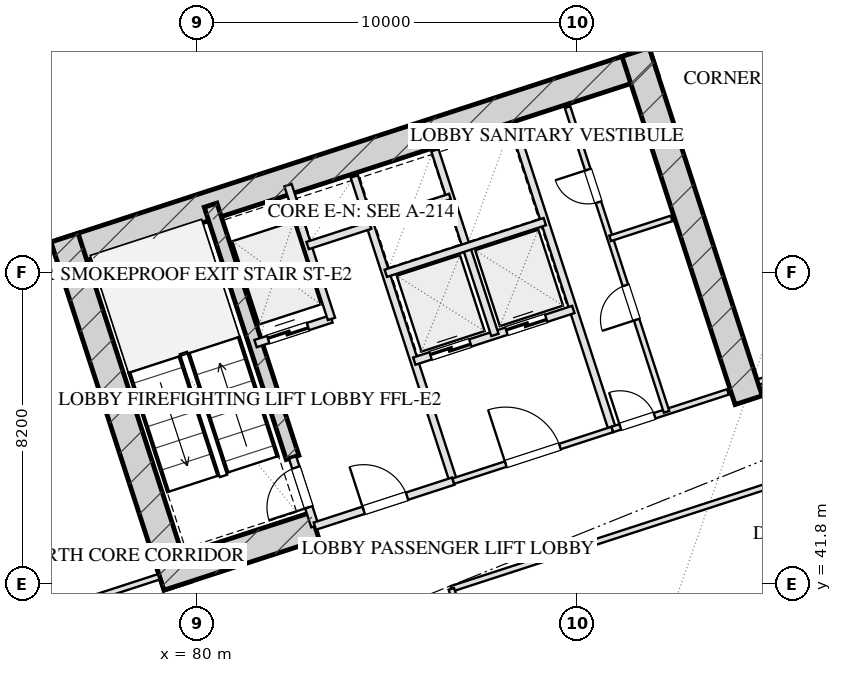
"""IFC4 building model, lengths in metres.
Left out: names, types, materials, properties, quantities, classifications, styles, units other than length and angle.
Written with IfcOpenShell. Run it as: python <this file> out.ifc"""

import sys

from ifc_helpers import new_model, si_unit, direction, frame, frame_2d, origin, place, context, subcontext, project, spatial, rectangle, extrude, element, fill, save


model = new_model("IFC4")
c1 = context("Model", 3, precision=1e-05, world=origin(), true_north=direction((0.0, 1.0)))
c2 = subcontext(c1, "Body", "Model", "MODEL_VIEW")
j1 = project(units=[si_unit("LENGTHUNIT", "METRE"), si_unit("PLANEANGLEUNIT", "RADIAN")], contexts=[c1])
p1 = place(None, origin())
s1 = spatial("IfcSite", under=j1, at=p1, CompositionType="ELEMENT")
p2 = place(p1, origin())
s2 = spatial("IfcBuilding", under=s1, at=p2, CompositionType="ELEMENT")
p3 = place(p2, frame((0.0, 0.0, 26.0)))
s3 = spatial("IfcBuildingStorey", under=s2, at=p3, CompositionType="ELEMENT", Elevation=26.0)
p4 = place(p3, frame((76.272, 50.443, 0.0), z_axis=(0.0, 0.0, 1.0), x_axis=(0.951056072937, 0.309018358888, 0.0)))
e1 = element("IfcWall", 1, at=p4, inside=s3, PredefinedType="SHEAR", context=c2, shape_type="SweptSolid", body=[
    extrude(rectangle(XDim=16.55, YDim=0.75, at=frame_2d((8.275, 0.0))), origin(), (0.0, 0.0, 1.0), 4.0),
])
for number, where, z_axis, x_axis in (
    (2, (79.489, 41.756, 0.0), (0.0, 0.0, 1.0), (-0.309, 0.951, 0.0)),
    (3, (94.515, 46.639, 0.0), (0.0, 0.0, 1.0), (-0.309, 0.951, 0.0)),
):
    element("IfcWall", number, at=place(p3, frame(where, z_axis=z_axis, x_axis=x_axis)), inside=s3, PredefinedType="SHEAR", context=c2, shape_type="SweptSolid", body=[
        extrude(rectangle(XDim=9.63, YDim=0.75, at=frame_2d((4.815, 0.0))), origin(), (0.0, 0.0, 1.0), 4.0),
    ])
p5 = place(p3, frame((82.514, 45.131, 0.0), z_axis=(0.0, 0.0, 1.0), x_axis=(-0.308988790936, 0.951065679686, 0.0)))
e4 = element("IfcWall", 4, at=p5, inside=s3, PredefinedType="SHEAR", context=c2, shape_type="SweptSolid", body=[
    extrude(rectangle(XDim=6.98, YDim=0.35, at=frame_2d((3.49, 0.0))), origin(), (0.0, 0.0, 1.0), 4.0),
])
p6 = place(p3, frame((79.016, 41.997, 0.0), z_axis=(0.0, 0.0, 1.0), x_axis=(0.95106038264, 0.309005094736, 0.0)))
e5 = element("IfcWall", 5, at=p6, inside=s3, PredefinedType="SHEAR", context=c2, shape_type="SweptSolid", body=[
    extrude(rectangle(XDim=4.295, YDim=0.75, at=frame_2d((2.147, 0.0))), origin(), (0.0, 0.0, 1.0), 4.0),
])
p7 = place(p3, frame((79.655, 4.352, 0.0), z_axis=(0.0, 0.0, 1.0), x_axis=(-0.309014526607, 0.951057318118, 0.0)))
e6 = element("IfcWall", 6, at=p7, inside=s3, PredefinedType="SOLIDWALL", context=c2, shape_type="SweptSolid", body=[
    extrude(rectangle(XDim=50.0, YDim=0.4, at=frame_2d((25.0, 0.0))), origin(), (0.0, 0.0, 1.0), 3.16),
])
p8 = place(p7, frame((17.35, 0.0, 0.75)))
e7 = element("IfcOpeningElement", 7, at=p8, cuts=e6, PredefinedType="OPENING", context=c2, shape_type="SweptSolid", body=[
    extrude(rectangle(XDim=2.5, YDim=1.75, at=frame_2d((1.25, 0.875))), frame((0.0, 0.21, 0.0), z_axis=(0.0, -1.0, 0.0), x_axis=(1.0, 0.0, 0.0)), (0.0, 0.0, 1.0), 0.42),
])
p9 = place(p7, frame((21.15, 0.0, 0.75)))
e8 = element("IfcOpeningElement", 8, at=p9, cuts=e6, PredefinedType="OPENING", context=c2, shape_type="SweptSolid", body=[
    extrude(rectangle(XDim=2.5, YDim=1.75, at=frame_2d((1.25, 0.875))), frame((0.0, 0.21, 0.0), z_axis=(0.0, -1.0, 0.0), x_axis=(1.0, 0.0, 0.0)), (0.0, 0.0, 1.0), 0.42),
])
p10 = place(p7, frame((26.35, 0.0, 0.75)))
e9 = element("IfcOpeningElement", 9, at=p10, cuts=e6, PredefinedType="OPENING", context=c2, shape_type="SweptSolid", body=[
    extrude(rectangle(XDim=2.5, YDim=1.75, at=frame_2d((1.25, 0.875))), frame((0.0, 0.21, 0.0), z_axis=(0.0, -1.0, 0.0), x_axis=(1.0, 0.0, 0.0)), (0.0, 0.0, 1.0), 0.42),
])
p11 = place(p7, frame((30.15, 0.0, 0.75)))
e10 = element("IfcOpeningElement", 10, at=p11, cuts=e6, PredefinedType="OPENING", context=c2, shape_type="SweptSolid", body=[
    extrude(rectangle(XDim=2.5, YDim=1.75, at=frame_2d((1.25, 0.875))), frame((0.0, 0.21, 0.0), z_axis=(0.0, -1.0, 0.0), x_axis=(1.0, 0.0, 0.0)), (0.0, 0.0, 1.0), 0.42),
])
p12 = place(p3, frame((66.002, 55.433, 0.0), z_axis=(0.0, 0.0, 1.0), x_axis=(0.951055939317, 0.309018770125, 0.0)))
e11 = element("IfcWall", 11, at=p12, inside=s3, PredefinedType="SOLIDWALL", context=c2, shape_type="SweptSolid", body=[
    extrude(rectangle(XDim=32.4, YDim=0.4, at=frame_2d((16.2, 0.0))), origin(), (0.0, 0.0, 1.0), 3.16),
])
p13 = place(p3, frame((83.101, 43.324, 0.0), z_axis=(0.0, 0.0, 1.0), x_axis=(-0.309048298632, 0.951046344356, 0.0)))
e12 = element("IfcWall", 12, at=p13, inside=s3, PredefinedType="PARTITIONING", context=c2, shape_type="SweptSolid", body=[
    extrude(rectangle(XDim=1.9, YDim=0.2, at=frame_2d((0.95, 0.0))), origin(), (0.0, 0.0, 1.0), 3.725),
])
p14 = place(p13, frame((0.52, 0.0, 0.0)))
e13 = element("IfcOpeningElement", 13, at=p14, cuts=e12, PredefinedType="OPENING", context=c2, shape_type="SweptSolid", body=[
    extrude(rectangle(XDim=1.1, YDim=2.05, at=frame_2d((0.55, 1.025))), frame((0.0, 0.11, 0.0), z_axis=(0.0, -1.0, 0.0), x_axis=(1.0, 0.0, 0.0)), (0.0, 0.0, 1.0), 0.22),
])
p15 = place(p3, frame((86.743, 44.508, 0.0), z_axis=(0.0, 0.0, 1.0), x_axis=(-0.309016001439, 0.951056838919, 0.0)))
e14 = element("IfcWall", 14, at=p15, inside=s3, PredefinedType="PARTITIONING", context=c2, shape_type="SweptSolid", body=[
    extrude(rectangle(XDim=8.43, YDim=0.2, at=frame_2d((4.215, 0.0))), origin(), (0.0, 0.0, 1.0), 3.725),
])
p16 = place(p3, frame((83.101, 43.324, 0.0), z_axis=(0.0, 0.0, 1.0), x_axis=(0.951052804469, 0.309028417967, 0.0)))
e15 = element("IfcWall", 15, at=p16, inside=s3, PredefinedType="PARTITIONING", context=c2, shape_type="SweptSolid", body=[
    extrude(rectangle(XDim=3.83, YDim=0.2, at=frame_2d((1.915, 0.0))), origin(), (0.0, 0.0, 1.0), 3.725),
])
p17 = place(p16, frame((1.35, 0.0, 0.0)))
e16 = element("IfcOpeningElement", 16, at=p17, cuts=e15, PredefinedType="OPENING", context=c2, shape_type="SweptSolid", body=[
    extrude(rectangle(XDim=1.2, YDim=2.05, at=frame_2d((0.6, 1.025))), frame((0.0, 0.11, 0.0), z_axis=(0.0, -1.0, 0.0), x_axis=(1.0, 0.0, 0.0)), (0.0, 0.0, 1.0), 0.22),
])
p18 = place(p3, frame((81.54, 48.127, 0.0), z_axis=(0.0, 0.0, 1.0), x_axis=(0.951062257173, 0.308999325213, 0.0)))
e17 = element("IfcWall", 17, at=p18, inside=s3, PredefinedType="PARTITIONING", context=c2, shape_type="SweptSolid", body=[
    extrude(rectangle(XDim=2.1, YDim=0.2, at=frame_2d((1.05, 0.0))), origin(), (0.0, 0.0, 1.0), 3.725),
])
p19 = place(p18, frame((0.35, 0.0, 0.0)))
e18 = element("IfcOpeningElement", 18, at=p19, cuts=e17, PredefinedType="OPENING", context=c2, shape_type="SweptSolid", body=[
    extrude(rectangle(XDim=1.1, YDim=2.05, at=frame_2d((0.55, 1.025))), frame((0.0, 0.11, 0.0), z_axis=(0.0, -1.0, 0.0), x_axis=(1.0, 0.0, 0.0)), (0.0, 0.0, 1.0), 0.22),
])
p20 = place(p3, frame((83.538, 48.776, 0.0), z_axis=(0.0, 0.0, 1.0), x_axis=(-0.3089935693, 0.951064127245, 0.0)))
e19 = element("IfcWall", 19, at=p20, inside=s3, PredefinedType="PARTITIONING", context=c2, shape_type="SweptSolid", body=[
    extrude(rectangle(XDim=3.7, YDim=0.2, at=frame_2d((1.85, 0.0))), origin(), (0.0, 0.0, 1.0), 3.725),
])
p21 = place(p3, frame((82.91, 50.707, 0.0), z_axis=(0.0, 0.0, 1.0), x_axis=(0.951041328149, 0.309063734775, 0.0)))
e20 = element("IfcWall", 20, at=p21, inside=s3, PredefinedType="PARTITIONING", context=c2, shape_type="SweptSolid", body=[
    extrude(rectangle(XDim=1.73, YDim=0.2, at=frame_2d((0.865, 0.0))), origin(), (0.0, 0.0, 1.0), 3.725),
])
p22 = place(p3, frame((90.928, 45.868, 0.0), z_axis=(0.0, 0.0, 1.0), x_axis=(-0.309042196757, 0.951048327176, 0.0)))
e21 = element("IfcWall", 21, at=p22, inside=s3, PredefinedType="PARTITIONING", context=c2, shape_type="SweptSolid", body=[
    extrude(rectangle(XDim=8.43, YDim=0.2, at=frame_2d((4.215, 0.0))), origin(), (0.0, 0.0, 1.0), 3.725),
])
p23 = place(p3, frame((86.743, 44.508, 0.0), z_axis=(0.0, 0.0, 1.0), x_axis=(0.951063829732, 0.308994485023, 0.0)))
e22 = element("IfcWall", 22, at=p23, inside=s3, PredefinedType="PARTITIONING", context=c2, shape_type="SweptSolid", body=[
    extrude(rectangle(XDim=4.4, YDim=0.15, at=frame_2d((2.2, 0.0))), origin(), (0.0, 0.0, 1.0), 3.725),
])
p24 = place(p23, frame((1.45, 0.0, 0.0)))
e23 = element("IfcOpeningElement", 23, at=p24, cuts=e22, PredefinedType="OPENING", context=c2, shape_type="SweptSolid", body=[
    extrude(rectangle(XDim=1.5, YDim=2.05, at=frame_2d((0.75, 1.025))), frame((0.0, 0.085, 0.0), z_axis=(0.0, -1.0, 0.0), x_axis=(1.0, 0.0, 0.0)), (0.0, 0.0, 1.0), 0.17),
])
p25 = place(p3, frame((85.718, 47.666, 0.0), z_axis=(0.0, 0.0, 1.0), x_axis=(0.951058531764, 0.30901079133, 0.0)))
e24 = element("IfcWall", 24, at=p25, inside=s3, PredefinedType="PARTITIONING", context=c2, shape_type="SweptSolid", body=[
    extrude(rectangle(XDim=4.4, YDim=0.2, at=frame_2d((2.2, 0.0))), origin(), (0.0, 0.0, 1.0), 3.725),
])
p26 = place(p25, frame((0.45, 0.0, 0.0)))
e25 = element("IfcOpeningElement", 25, at=p26, cuts=e24, PredefinedType="OPENING", context=c2, shape_type="SweptSolid", body=[
    extrude(rectangle(XDim=1.1, YDim=2.05, at=frame_2d((0.55, 1.025))), frame((0.0, 0.11, 0.0), z_axis=(0.0, -1.0, 0.0), x_axis=(1.0, 0.0, 0.0)), (0.0, 0.0, 1.0), 0.22),
])
p27 = place(p25, frame((2.55, 0.0, 0.0)))
e26 = element("IfcOpeningElement", 26, at=p27, cuts=e24, PredefinedType="OPENING", context=c2, shape_type="SweptSolid", body=[
    extrude(rectangle(XDim=1.1, YDim=2.05, at=frame_2d((0.55, 1.025))), frame((0.0, 0.11, 0.0), z_axis=(0.0, -1.0, 0.0), x_axis=(1.0, 0.0, 0.0)), (0.0, 0.0, 1.0), 0.22),
])
p28 = place(p3, frame((87.838, 48.354, 0.0), z_axis=(0.0, 0.0, 1.0), x_axis=(-0.3090093719, 0.951058992953, 0.0)))
e27 = element("IfcWall", 27, at=p28, inside=s3, PredefinedType="PARTITIONING", context=c2, shape_type="SweptSolid", body=[
    extrude(rectangle(XDim=5.11, YDim=0.2, at=frame_2d((2.555, 0.0))), origin(), (0.0, 0.0, 1.0), 3.725),
])
p29 = place(p3, frame((84.967, 49.977, 0.0), z_axis=(0.0, 0.0, 1.0), x_axis=(0.951063829732, 0.308994485023, 0.0)))
e28 = element("IfcWall", 28, at=p29, inside=s3, PredefinedType="PARTITIONING", context=c2, shape_type="SweptSolid", body=[
    extrude(rectangle(XDim=4.4, YDim=0.2, at=frame_2d((2.2, 0.0))), origin(), (0.0, 0.0, 1.0), 3.725),
])
p30 = place(p3, frame((84.534, 51.308, 0.0), z_axis=(0.0, 0.0, 1.0), x_axis=(0.951075093106, 0.308959814982, 0.0)))
e29 = element("IfcWall", 29, at=p30, inside=s3, PredefinedType="PARTITIONING", context=c2, shape_type="SweptSolid", body=[
    extrude(rectangle(XDim=2.23, YDim=0.15, at=frame_2d((1.115, 0.0))), origin(), (0.0, 0.0, 1.0), 3.725),
])
p31 = place(p3, frame((90.928, 45.868, 0.0), z_axis=(0.0, 0.0, 1.0), x_axis=(0.951059297078, 0.309008435874, 0.0)))
e30 = element("IfcWall", 30, at=p31, inside=s3, PredefinedType="PARTITIONING", context=c2, shape_type="SweptSolid", body=[
    extrude(rectangle(XDim=3.2, YDim=0.15, at=frame_2d((1.6, 0.0))), origin(), (0.0, 0.0, 1.0), 3.725),
])
p32 = place(p31, frame((0.22, 0.0, 0.0)))
e31 = element("IfcOpeningElement", 31, at=p32, cuts=e30, PredefinedType="OPENING", context=c2, shape_type="SweptSolid", body=[
    extrude(rectangle(XDim=0.95, YDim=2.05, at=frame_2d((0.475, 1.025))), frame((0.0, 0.085, 0.0), z_axis=(0.0, -1.0, 0.0), x_axis=(1.0, 0.0, 0.0)), (0.0, 0.0, 1.0), 0.17),
])
p33 = place(p3, frame((92.355, 46.331, 0.0), z_axis=(0.0, 0.0, 1.0), x_axis=(-0.309007490203, 0.951059604335, 0.0)))
e32 = element("IfcWall", 32, at=p33, inside=s3, PredefinedType="PARTITIONING", context=c2, shape_type="SweptSolid", body=[
    extrude(rectangle(XDim=8.43, YDim=0.15, at=frame_2d((4.215, 0.0))), origin(), (0.0, 0.0, 1.0), 3.725),
])
p34 = place(p33, frame((2.55, 0.0, 0.0)))
e33 = element("IfcOpeningElement", 33, at=p34, cuts=e32, PredefinedType="OPENING", context=c2, shape_type="SweptSolid", body=[
    extrude(rectangle(XDim=0.95, YDim=2.05, at=frame_2d((0.475, 1.025))), frame((0.0, 0.085, 0.0), z_axis=(0.0, -1.0, 0.0), x_axis=(1.0, 0.0, 0.0)), (0.0, 0.0, 1.0), 0.17),
])
p35 = place(p33, frame((5.8, 0.0, 0.0)))
e34 = element("IfcOpeningElement", 34, at=p35, cuts=e32, PredefinedType="OPENING", context=c2, shape_type="SweptSolid", body=[
    extrude(rectangle(XDim=0.9, YDim=2.05, at=frame_2d((0.45, 1.025))), frame((0.0, 0.085, 0.0), z_axis=(0.0, -1.0, 0.0), x_axis=(1.0, 0.0, 0.0)), (0.0, 0.0, 1.0), 0.17),
])
p36 = place(p3, frame((90.871, 50.896, 0.0), z_axis=(0.0, 0.0, 1.0), x_axis=(0.951054116971, 0.309024378638, 0.0)))
e35 = element("IfcWall", 35, at=p36, inside=s3, PredefinedType="PARTITIONING", context=c2, shape_type="SweptSolid", body=[
    extrude(rectangle(XDim=1.7, YDim=0.15, at=frame_2d((0.85, 0.0))), origin(), (0.0, 0.0, 1.0), 3.725),
])
p37 = place(p3, frame((68.721, 38.652, 0.0), z_axis=(0.0, 0.0, 1.0), x_axis=(0.951056658866, 0.309016555588, 0.0)))
e36 = element("IfcWall", 36, at=p37, inside=s3, PredefinedType="PARTITIONING", context=c2, shape_type="SweptSolid", body=[
    extrude(rectangle(XDim=10.8, YDim=0.15, at=frame_2d((5.4, 0.0))), origin(), (0.0, 0.0, 1.0), 3.725),
])
p38 = place(p37, frame((4.536, 0.0, 0.0)))
e37 = element("IfcOpeningElement", 37, at=p38, cuts=e36, PredefinedType="OPENING", context=c2, shape_type="SweptSolid", body=[
    extrude(rectangle(XDim=0.85, YDim=2.05, at=frame_2d((0.425, 1.025))), frame((0.0, 0.085, 0.0), z_axis=(0.0, -1.0, 0.0), x_axis=(1.0, 0.0, 0.0)), (0.0, 0.0, 1.0), 0.17),
])
p39 = place(p3, frame((94.78, 47.119, 0.0), z_axis=(0.0, 0.0, 1.0), x_axis=(0.951054294345, 0.309023832749, 0.0)))
e38 = element("IfcWall", 38, at=p39, inside=s3, PredefinedType="PARTITIONING", context=c2, shape_type="SweptSolid", body=[
    extrude(rectangle(XDim=10.2, YDim=0.15, at=frame_2d((5.1, 0.0))), origin(), (0.0, 0.0, 1.0), 3.725),
])
p40 = place(p39, frame((4.284, 0.0, 0.0)))
e39 = element("IfcOpeningElement", 39, at=p40, cuts=e38, PredefinedType="OPENING", context=c2, shape_type="SweptSolid", body=[
    extrude(rectangle(XDim=1.0, YDim=2.05, at=frame_2d((0.5, 1.025))), frame((0.0, 0.085, 0.0), z_axis=(0.0, -1.0, 0.0), x_axis=(1.0, 0.0, 0.0)), (0.0, 0.0, 1.0), 0.17),
])
p41 = place(p3, frame((86.692, 41.673, 0.0), z_axis=(0.0, 0.0, 1.0), x_axis=(0.951055605195, 0.309019798438, 0.0)))
e40 = element("IfcWall", 40, at=p41, inside=s3, PredefinedType="PARTITIONING", context=c2, shape_type="SweptSolid", body=[
    extrude(rectangle(XDim=19.575, YDim=0.15, at=frame_2d((9.788, 0.0))), origin(), (0.0, 0.0, 1.0), 3.725),
])
p42 = place(p3, frame((91.834, 25.848, 0.0), z_axis=(0.0, 0.0, 1.0), x_axis=(-0.30901773025, 0.951056277195, 0.0)))
e41 = element("IfcWall", 41, at=p42, inside=s3, PredefinedType="PARTITIONING", context=c2, shape_type="SweptSolid", body=[
    extrude(rectangle(XDim=16.64, YDim=0.15, at=frame_2d((8.32, 0.0))), origin(), (0.0, 0.0, 1.0), 3.725),
])
p43 = place(p42, frame((1.663, 0.0, 0.0)))
e42 = element("IfcOpeningElement", 42, at=p43, cuts=e41, PredefinedType="OPENING", context=c2, shape_type="SweptSolid", body=[
    extrude(rectangle(XDim=1.0, YDim=2.05, at=frame_2d((0.5, 1.025))), frame((0.0, 0.085, 0.0), z_axis=(0.0, -1.0, 0.0), x_axis=(1.0, 0.0, 0.0)), (0.0, 0.0, 1.0), 0.17),
])
p44 = place(p42, frame((6.156, 0.0, 0.0)))
e43 = element("IfcOpeningElement", 43, at=p44, cuts=e41, PredefinedType="OPENING", context=c2, shape_type="SweptSolid", body=[
    extrude(rectangle(XDim=1.0, YDim=2.05, at=frame_2d((0.5, 1.025))), frame((0.0, 0.085, 0.0), z_axis=(0.0, -1.0, 0.0), x_axis=(1.0, 0.0, 0.0)), (0.0, 0.0, 1.0), 0.17),
])
p45 = place(p42, frame((10.649, 0.0, 0.0)))
e44 = element("IfcOpeningElement", 44, at=p45, cuts=e41, PredefinedType="OPENING", context=c2, shape_type="SweptSolid", body=[
    extrude(rectangle(XDim=1.0, YDim=2.05, at=frame_2d((0.5, 1.025))), frame((0.0, 0.085, 0.0), z_axis=(0.0, -1.0, 0.0), x_axis=(1.0, 0.0, 0.0)), (0.0, 0.0, 1.0), 0.17),
])
p46 = place(p42, frame((14.476, 0.0, 0.0)))
e45 = element("IfcOpeningElement", 45, at=p46, cuts=e41, PredefinedType="OPENING", context=c2, shape_type="SweptSolid", body=[
    extrude(rectangle(XDim=1.0, YDim=2.05, at=frame_2d((0.5, 1.025))), frame((0.0, 0.085, 0.0), z_axis=(0.0, -1.0, 0.0), x_axis=(1.0, 0.0, 0.0)), (0.0, 0.0, 1.0), 0.17),
])
p47 = place(p3, frame((87.72, 38.508, 0.0), z_axis=(0.0, 0.0, 1.0), x_axis=(0.951059270613, 0.309008517326, 0.0)))
e46 = element("IfcWall", 46, at=p47, inside=s3, PredefinedType="PARTITIONING", context=c2, shape_type="SweptSolid", body=[
    extrude(rectangle(XDim=19.575, YDim=0.15, at=frame_2d((9.788, 0.0))), origin(), (0.0, 0.0, 1.0), 3.725),
])
p48 = place(p14, origin())
e47 = element("IfcDoor", 47, at=p48, inside=s3, OperationType="SINGLE_SWING_LEFT", PredefinedType="DOOR", context=c2, shape_type="SweptSolid", body=[
    extrude(rectangle(XDim=1.1, YDim=2.05, at=frame_2d((0.55, 1.025))), frame((0.0, 0.025, 0.0), z_axis=(0.0, -1.0, 0.0), x_axis=(1.0, 0.0, 0.0)), (0.0, 0.0, 1.0), 0.05),
])
fill(e13, e47)
p49 = place(p17, origin())
e48 = element("IfcDoor", 48, at=p49, inside=s3, OperationType="SINGLE_SWING_LEFT", PredefinedType="DOOR", context=c2, shape_type="SweptSolid", body=[
    extrude(rectangle(XDim=1.2, YDim=2.05, at=frame_2d((0.6, 1.025))), frame((0.0, 0.025, 0.0), z_axis=(0.0, -1.0, 0.0), x_axis=(1.0, 0.0, 0.0)), (0.0, 0.0, 1.0), 0.05),
])
fill(e16, e48)
p50 = place(p19, origin())
e49 = element("IfcDoor", 49, at=p50, inside=s3, OperationType="DOUBLE_DOOR_SLIDING", PredefinedType="DOOR", context=c2, shape_type="SweptSolid", body=[
    extrude(rectangle(XDim=1.1, YDim=2.05, at=frame_2d((0.55, 1.025))), frame((0.0, 0.025, 0.0), z_axis=(0.0, -1.0, 0.0), x_axis=(1.0, 0.0, 0.0)), (0.0, 0.0, 1.0), 0.05),
])
fill(e18, e49)
p51 = place(p24, origin())
e50 = element("IfcDoor", 50, at=p51, inside=s3, OperationType="SINGLE_SWING_LEFT", PredefinedType="DOOR", context=c2, shape_type="SweptSolid", body=[
    extrude(rectangle(XDim=1.5, YDim=2.05, at=frame_2d((0.75, 1.025))), frame((0.0, 0.025, 0.0), z_axis=(0.0, -1.0, 0.0), x_axis=(1.0, 0.0, 0.0)), (0.0, 0.0, 1.0), 0.05),
])
fill(e23, e50)
p52 = place(p26, origin())
e51 = element("IfcDoor", 51, at=p52, inside=s3, OperationType="DOUBLE_DOOR_SLIDING", PredefinedType="DOOR", context=c2, shape_type="SweptSolid", body=[
    extrude(rectangle(XDim=1.1, YDim=2.05, at=frame_2d((0.55, 1.025))), frame((0.0, 0.025, 0.0), z_axis=(0.0, -1.0, 0.0), x_axis=(1.0, 0.0, 0.0)), (0.0, 0.0, 1.0), 0.05),
])
fill(e25, e51)
p53 = place(p27, origin())
e52 = element("IfcDoor", 52, at=p53, inside=s3, OperationType="DOUBLE_DOOR_SLIDING", PredefinedType="DOOR", context=c2, shape_type="SweptSolid", body=[
    extrude(rectangle(XDim=1.1, YDim=2.05, at=frame_2d((0.55, 1.025))), frame((0.0, 0.025, 0.0), z_axis=(0.0, -1.0, 0.0), x_axis=(1.0, 0.0, 0.0)), (0.0, 0.0, 1.0), 0.05),
])
fill(e26, e52)
p54 = place(p32, origin())
e53 = element("IfcDoor", 53, at=p54, inside=s3, OperationType="SINGLE_SWING_LEFT", PredefinedType="DOOR", context=c2, shape_type="SweptSolid", body=[
    extrude(rectangle(XDim=0.95, YDim=2.05, at=frame_2d((0.475, 1.025))), frame((0.0, 0.025, 0.0), z_axis=(0.0, -1.0, 0.0), x_axis=(1.0, 0.0, 0.0)), (0.0, 0.0, 1.0), 0.05),
])
fill(e31, e53)
p55 = place(p34, origin())
e54 = element("IfcDoor", 54, at=p55, inside=s3, OperationType="SINGLE_SWING_LEFT", PredefinedType="DOOR", context=c2, shape_type="SweptSolid", body=[
    extrude(rectangle(XDim=0.95, YDim=2.05, at=frame_2d((0.475, 1.025))), frame((0.0, 0.025, 0.0), z_axis=(0.0, -1.0, 0.0), x_axis=(1.0, 0.0, 0.0)), (0.0, 0.0, 1.0), 0.05),
])
fill(e33, e54)
p56 = place(p35, origin())
e55 = element("IfcDoor", 55, at=p56, inside=s3, OperationType="SINGLE_SWING_RIGHT", PredefinedType="DOOR", context=c2, shape_type="SweptSolid", body=[
    extrude(rectangle(XDim=0.9, YDim=2.05, at=frame_2d((0.45, 1.025))), frame((0.0, 0.025, 0.0), z_axis=(0.0, -1.0, 0.0), x_axis=(1.0, 0.0, 0.0)), (0.0, 0.0, 1.0), 0.05),
])
fill(e34, e55)
save(model, sys.argv[1])
